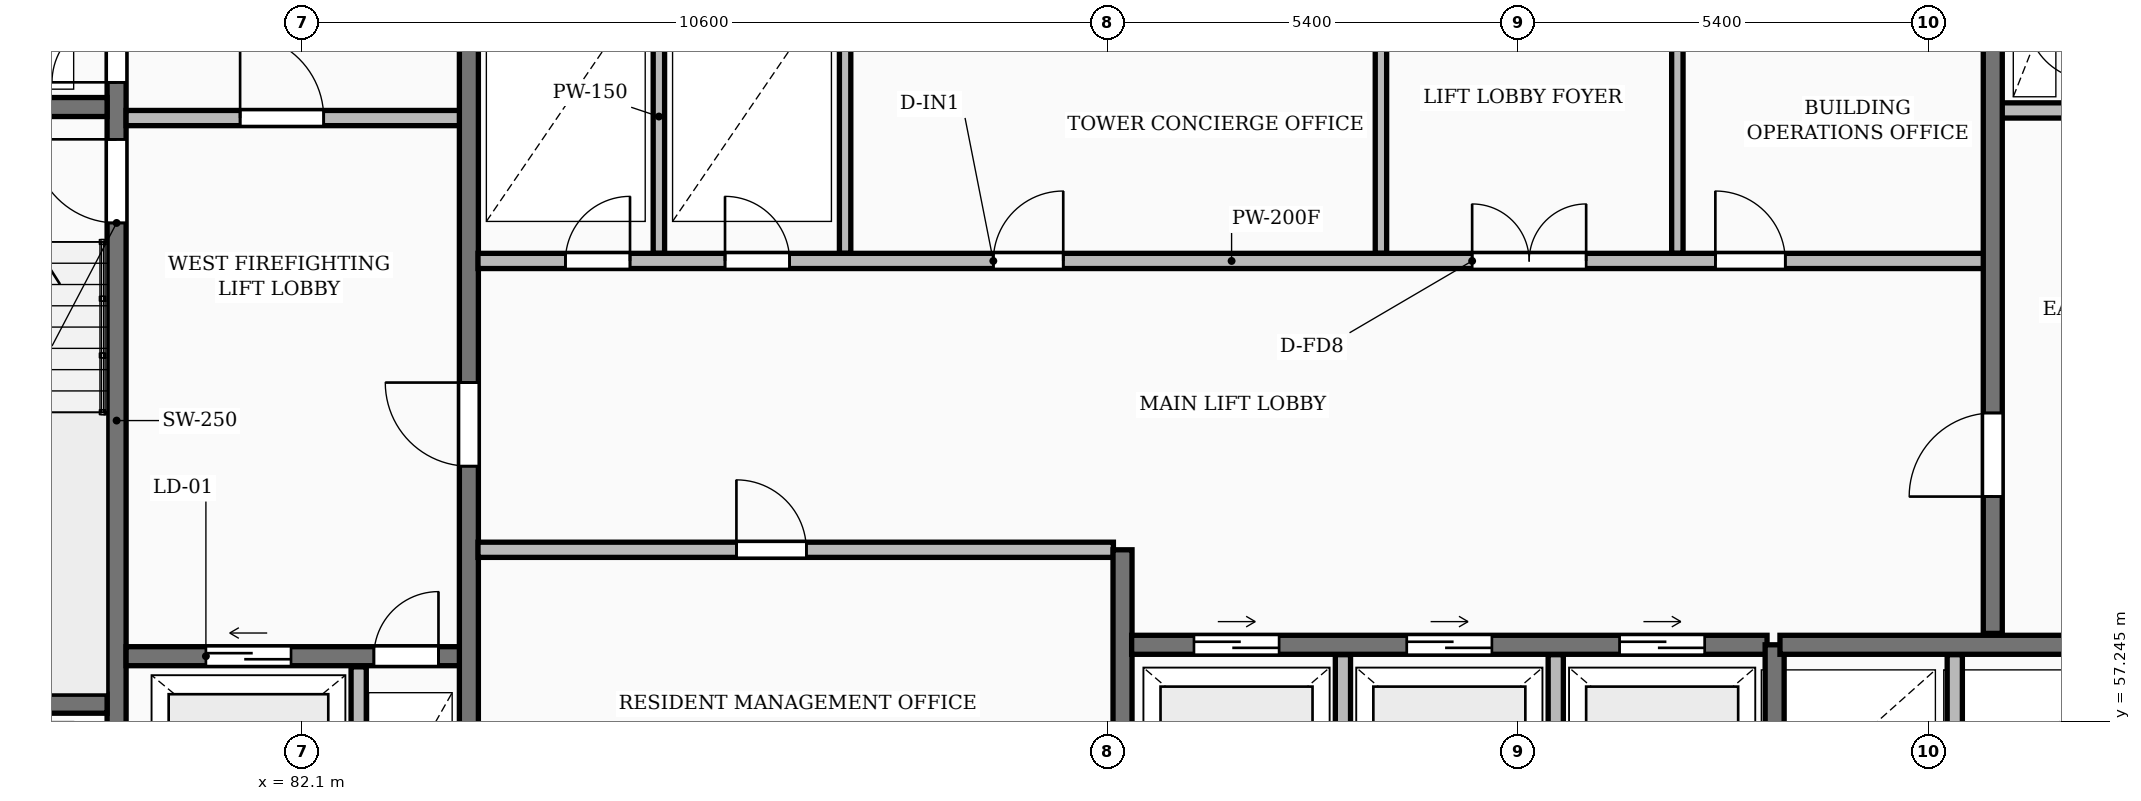
"""IFC4 building model, lengths in metres.
Left out: names, types, materials, properties, quantities, classifications, styles, units other than length and angle.
Written with IfcOpenShell. Run it as: python <this file> out.ifc"""

import sys

from ifc_helpers import new_model, si_unit, direction, frame, frame_2d, origin, place, context, subcontext, project, spatial, rectangle, extrude, element, fill, save


model = new_model("IFC4")
c1 = context("Model", 3, precision=1e-05, world=origin(), true_north=direction((0.0, 1.0)))
c2 = subcontext(c1, "Body", "Model", "MODEL_VIEW")
j1 = project(units=[si_unit("LENGTHUNIT", "METRE"), si_unit("PLANEANGLEUNIT", "RADIAN")], contexts=[c1])
p1 = place(None, origin())
s1 = spatial("IfcSite", under=j1, at=p1, CompositionType="ELEMENT")
p2 = place(p1, origin())
s2 = spatial("IfcBuilding", under=s1, at=p2, CompositionType="ELEMENT")
p3 = place(p2, frame((0.0, 0.0, 168.6)))
s3 = spatial("IfcBuildingStorey", under=s2, at=p3, CompositionType="ELEMENT", Elevation=168.6)
p4 = place(p3, frame((79.665, 55.4, 0.0), z_axis=(0.0, 0.0, 1.0), x_axis=(0.0, 1.0, 0.0)))
e1 = element("IfcWall", 1, at=p4, inside=s3, PredefinedType="SHEAR", context=c2, shape_type="SweptSolid", body=[
    extrude(rectangle(XDim=11.6, YDim=0.25, at=frame_2d((5.8, 0.0))), origin(), (0.0, 0.0, 1.0), 3.25),
])
p5 = place(p4, frame((0.55, 0.0, 0.0)))
e2 = element("IfcOpeningElement", 2, at=p5, cuts=e1, PredefinedType="OPENING", context=c2, shape_type="SweptSolid", body=[
    extrude(rectangle(XDim=0.85, YDim=2.05, at=frame_2d((0.425, 1.025))), frame((0.0, 0.135, 0.0), z_axis=(0.0, -1.0, 0.0), x_axis=(1.0, 0.0, 0.0)), (0.0, 0.0, 1.0), 0.27),
])
p6 = place(p4, frame((8.4, 0.0, 0.0)))
e3 = element("IfcOpeningElement", 3, at=p6, cuts=e1, PredefinedType="OPENING", context=c2, shape_type="SweptSolid", body=[
    extrude(rectangle(XDim=1.1, YDim=2.1, at=frame_2d((0.55, 1.05))), frame((0.0, 0.135, 0.0), z_axis=(0.0, -1.0, 0.0), x_axis=(1.0, 0.0, 0.0)), (0.0, 0.0, 1.0), 0.27),
])
p7 = place(p4, frame((10.25, 0.0, 0.0)))
e4 = element("IfcOpeningElement", 4, at=p7, cuts=e1, PredefinedType="OPENING", context=c2, shape_type="SweptSolid", body=[
    extrude(rectangle(XDim=0.85, YDim=2.05, at=frame_2d((0.425, 1.025))), frame((0.0, 0.135, 0.0), z_axis=(0.0, -1.0, 0.0), x_axis=(1.0, 0.0, 0.0)), (0.0, 0.0, 1.0), 0.27),
])
for number, where, z_axis, x_axis in (
    (5, (76.3, 57.475, 0.0), (0.0, 0.0, 1.0), (1.0, 0.0, 0.0)),
    (6, (76.3, 65.325, 0.0), (0.0, 0.0, 1.0), (1.0, 0.0, 0.0)),
):
    element("IfcWall", number, at=place(p3, frame(where, z_axis=z_axis, x_axis=x_axis)), inside=s3, PredefinedType="SHEAR", context=c2, shape_type="SweptSolid", body=[
        extrude(rectangle(XDim=3.24, YDim=0.25, at=frame_2d((1.62, 0.0))), origin(), (0.0, 0.0, 1.0), 3.25),
    ])
p8 = place(p3, frame((79.79, 58.1, 0.0), z_axis=(0.0, 0.0, 1.0), x_axis=(1.0, 0.0, 0.0)))
e7 = element("IfcWall", 7, at=p8, inside=s3, PredefinedType="SHEAR", context=c2, shape_type="SweptSolid", body=[
    extrude(rectangle(XDim=4.39, YDim=0.25, at=frame_2d((2.195, 0.0))), origin(), (0.0, 0.0, 1.0), 3.25),
])
p9 = place(p8, frame((1.05, 0.0, 0.0)))
e8 = element("IfcOpeningElement", 8, at=p9, cuts=e7, PredefinedType="OPENING", context=c2, shape_type="SweptSolid", body=[
    extrude(rectangle(XDim=1.12, YDim=2.12, at=frame_2d((0.56, 1.06))), frame((0.0, 0.135, 0.0), z_axis=(0.0, -1.0, 0.0), x_axis=(1.0, 0.0, 0.0)), (0.0, 0.0, 1.0), 0.27),
])
p10 = place(p8, frame((3.26, 0.0, 0.0)))
e9 = element("IfcOpeningElement", 9, at=p10, cuts=e7, PredefinedType="OPENING", context=c2, shape_type="SweptSolid", body=[
    extrude(rectangle(XDim=0.85, YDim=2.05, at=frame_2d((0.425, 1.025))), frame((0.0, 0.135, 0.0), z_axis=(0.0, -1.0, 0.0), x_axis=(1.0, 0.0, 0.0)), (0.0, 0.0, 1.0), 0.27),
])
p11 = place(p3, frame((82.85, 55.4, 0.0), z_axis=(0.0, 0.0, 1.0), x_axis=(0.0, 1.0, 0.0)))
e10 = element("IfcWall", 10, at=p11, inside=s3, PredefinedType="PARTITIONING", context=c2, shape_type="SweptSolid", body=[
    extrude(rectangle(XDim=2.56, YDim=0.2, at=frame_2d((1.28, 0.0))), origin(), (0.0, 0.0, 1.0), 2.97),
])
p12 = place(p3, frame((79.79, 65.18, 0.0), z_axis=(0.0, 0.0, 1.0), x_axis=(1.0, 0.0, 0.0)))
e11 = element("IfcWall", 11, at=p12, inside=s3, PredefinedType="PARTITIONING", context=c2, shape_type="SweptSolid", body=[
    extrude(rectangle(XDim=4.39, YDim=0.2, at=frame_2d((2.195, 0.0))), origin(), (0.0, 0.0, 1.0), 2.97),
])
p13 = place(p12, frame((1.5, 0.0, 0.0)))
e12 = element("IfcOpeningElement", 12, at=p13, cuts=e11, PredefinedType="OPENING", context=c2, shape_type="SweptSolid", body=[
    extrude(rectangle(XDim=1.1, YDim=2.1, at=frame_2d((0.55, 1.05))), frame((0.0, 0.11, 0.0), z_axis=(0.0, -1.0, 0.0), x_axis=(1.0, 0.0, 0.0)), (0.0, 0.0, 1.0), 0.22),
])
p14 = place(p3, frame((84.3, 55.4, 0.0), z_axis=(0.0, 0.0, 1.0), x_axis=(0.0, 1.0, 0.0)))
e13 = element("IfcWall", 13, at=p14, inside=s3, PredefinedType="SHEAR", context=c2, shape_type="SweptSolid", body=[
    extrude(rectangle(XDim=11.6, YDim=0.25, at=frame_2d((5.8, 0.0))), origin(), (0.0, 0.0, 1.0), 3.25),
])
p15 = place(p14, frame((5.2, 0.0, 0.0)))
e14 = element("IfcOpeningElement", 14, at=p15, cuts=e13, PredefinedType="OPENING", context=c2, shape_type="SweptSolid", body=[
    extrude(rectangle(XDim=1.1, YDim=2.1, at=frame_2d((0.55, 1.05))), frame((0.0, 0.135, 0.0), z_axis=(0.0, -1.0, 0.0), x_axis=(1.0, 0.0, 0.0)), (0.0, 0.0, 1.0), 0.27),
])
p16 = place(p3, frame((84.42, 59.5, 0.0), z_axis=(0.0, 0.0, 1.0), x_axis=(1.0, 0.0, 0.0)))
e15 = element("IfcWall", 15, at=p16, inside=s3, PredefinedType="PARTITIONING", context=c2, shape_type="SweptSolid", body=[
    extrude(rectangle(XDim=8.36, YDim=0.2, at=frame_2d((4.18, 0.0))), origin(), (0.0, 0.0, 1.0), 2.97),
])
p17 = place(p16, frame((3.4, 0.0, 0.0)))
e16 = element("IfcOpeningElement", 16, at=p17, cuts=e15, PredefinedType="OPENING", context=c2, shape_type="SweptSolid", body=[
    extrude(rectangle(XDim=0.92, YDim=2.08, at=frame_2d((0.46, 1.04))), frame((0.0, 0.11, 0.0), z_axis=(0.0, -1.0, 0.0), x_axis=(1.0, 0.0, 0.0)), (0.0, 0.0, 1.0), 0.22),
])
p18 = place(p3, frame((92.9, 55.4, 0.0), z_axis=(0.0, 0.0, 1.0), x_axis=(0.0, 1.0, 0.0)))
e17 = element("IfcWall", 17, at=p18, inside=s3, PredefinedType="SHEAR", context=c2, shape_type="SweptSolid", body=[
    extrude(rectangle(XDim=4.1, YDim=0.25, at=frame_2d((2.05, 0.0))), origin(), (0.0, 0.0, 1.0), 3.25),
])
for number, where, z_axis, x_axis in (
    (18, (95.8, 55.4, 0.0), (0.0, 0.0, 1.0), (0.0, 1.0, 0.0)),
    (19, (98.6, 55.4, 0.0), (0.0, 0.0, 1.0), (0.0, 1.0, 0.0)),
):
    element("IfcWall", number, at=place(p3, frame(where, z_axis=z_axis, x_axis=x_axis)), inside=s3, PredefinedType="PARTITIONING", context=c2, shape_type="SweptSolid", body=[
        extrude(rectangle(XDim=2.72, YDim=0.2, at=frame_2d((1.36, 0.0))), origin(), (0.0, 0.0, 1.0), 2.97),
    ])
p19 = place(p3, frame((93.02, 58.25, 0.0), z_axis=(0.0, 0.0, 1.0), x_axis=(1.0, 0.0, 0.0)))
e20 = element("IfcWall", 20, at=p19, inside=s3, PredefinedType="SHEAR", context=c2, shape_type="SweptSolid", body=[
    extrude(rectangle(XDim=8.36, YDim=0.25, at=frame_2d((4.18, 0.0))), origin(), (0.0, 0.0, 1.0), 3.25),
])
p20 = place(p19, frame((0.82, 0.0, 0.0)))
e21 = element("IfcOpeningElement", 21, at=p20, cuts=e20, PredefinedType="OPENING", context=c2, shape_type="SweptSolid", body=[
    extrude(rectangle(XDim=1.12, YDim=2.12, at=frame_2d((0.56, 1.06))), frame((0.0, 0.135, 0.0), z_axis=(0.0, -1.0, 0.0), x_axis=(1.0, 0.0, 0.0)), (0.0, 0.0, 1.0), 0.27),
])
p21 = place(p19, frame((3.62, 0.0, 0.0)))
e22 = element("IfcOpeningElement", 22, at=p21, cuts=e20, PredefinedType="OPENING", context=c2, shape_type="SweptSolid", body=[
    extrude(rectangle(XDim=1.12, YDim=2.12, at=frame_2d((0.56, 1.06))), frame((0.0, 0.135, 0.0), z_axis=(0.0, -1.0, 0.0), x_axis=(1.0, 0.0, 0.0)), (0.0, 0.0, 1.0), 0.27),
])
p22 = place(p19, frame((6.42, 0.0, 0.0)))
e23 = element("IfcOpeningElement", 23, at=p22, cuts=e20, PredefinedType="OPENING", context=c2, shape_type="SweptSolid", body=[
    extrude(rectangle(XDim=1.12, YDim=2.12, at=frame_2d((0.56, 1.06))), frame((0.0, 0.135, 0.0), z_axis=(0.0, -1.0, 0.0), x_axis=(1.0, 0.0, 0.0)), (0.0, 0.0, 1.0), 0.27),
])
p23 = place(p3, frame((101.48, 55.4, 0.0), z_axis=(0.0, 0.0, 1.0), x_axis=(0.0, 1.0, 0.0)))
e24 = element("IfcWall", 24, at=p23, inside=s3, PredefinedType="SHEAR", context=c2, shape_type="SweptSolid", body=[
    extrude(rectangle(XDim=2.85, YDim=0.25, at=frame_2d((1.425, 0.0))), origin(), (0.0, 0.0, 1.0), 3.25),
])
p24 = place(p3, frame((103.85, 55.4, 0.0), z_axis=(0.0, 0.0, 1.0), x_axis=(0.0, 1.0, 0.0)))
e25 = element("IfcWall", 25, at=p24, inside=s3, PredefinedType="PARTITIONING", context=c2, shape_type="SweptSolid", body=[
    extrude(rectangle(XDim=2.72, YDim=0.2, at=frame_2d((1.36, 0.0))), origin(), (0.0, 0.0, 1.0), 2.97),
])
p25 = place(p3, frame((101.55, 58.25, 0.0), z_axis=(0.0, 0.0, 1.0), x_axis=(1.0, 0.0, 0.0)))
e26 = element("IfcWall", 26, at=p25, inside=s3, PredefinedType="SHEAR", context=c2, shape_type="SweptSolid", body=[
    extrude(rectangle(XDim=4.6, YDim=0.25, at=frame_2d((2.3, 0.0))), origin(), (0.0, 0.0, 1.0), 3.25),
])
for number, where, z_axis, x_axis in (
    (27, (86.8, 63.4, 0.0), (0.0, 0.0, 1.0), (0.0, 1.0, 0.0)),
    (28, (89.25, 63.4, 0.0), (0.0, 0.0, 1.0), (0.0, 1.0, 0.0)),
    (29, (96.3, 63.4, 0.0), (0.0, 0.0, 1.0), (0.0, 1.0, 0.0)),
    (30, (100.2, 63.4, 0.0), (0.0, 0.0, 1.0), (0.0, 1.0, 0.0)),
):
    element("IfcWall", number, at=place(p3, frame(where, z_axis=z_axis, x_axis=x_axis)), inside=s3, PredefinedType="PARTITIONING", context=c2, shape_type="SweptSolid", body=[
        extrude(rectangle(XDim=3.6, YDim=0.15, at=frame_2d((1.8, 0.0))), origin(), (0.0, 0.0, 1.0), 2.97),
    ])
p26 = place(p3, frame((84.42, 63.3, 0.0), z_axis=(0.0, 0.0, 1.0), x_axis=(1.0, 0.0, 0.0)))
e31 = element("IfcWall", 31, at=p26, inside=s3, PredefinedType="PARTITIONING", context=c2, shape_type="SweptSolid", body=[
    extrude(rectangle(XDim=19.83, YDim=0.2, at=frame_2d((9.915, 0.0))), origin(), (0.0, 0.0, 1.0), 2.97),
])
p27 = place(p26, frame((1.15, 0.0, 0.0)))
e32 = element("IfcOpeningElement", 32, at=p27, cuts=e31, PredefinedType="OPENING", context=c2, shape_type="SweptSolid", body=[
    extrude(rectangle(XDim=0.85, YDim=2.05, at=frame_2d((0.425, 1.025))), frame((0.0, 0.11, 0.0), z_axis=(0.0, -1.0, 0.0), x_axis=(1.0, 0.0, 0.0)), (0.0, 0.0, 1.0), 0.22),
])
p28 = place(p26, frame((3.25, 0.0, 0.0)))
e33 = element("IfcOpeningElement", 33, at=p28, cuts=e31, PredefinedType="OPENING", context=c2, shape_type="SweptSolid", body=[
    extrude(rectangle(XDim=0.85, YDim=2.05, at=frame_2d((0.425, 1.025))), frame((0.0, 0.11, 0.0), z_axis=(0.0, -1.0, 0.0), x_axis=(1.0, 0.0, 0.0)), (0.0, 0.0, 1.0), 0.22),
])
p29 = place(p26, frame((13.08, 0.0, 0.0)))
e34 = element("IfcOpeningElement", 34, at=p29, cuts=e31, PredefinedType="OPENING", context=c2, shape_type="SweptSolid", body=[
    extrude(rectangle(XDim=1.5, YDim=2.2, at=frame_2d((0.75, 1.1))), frame((0.0, 0.11, 0.0), z_axis=(0.0, -1.0, 0.0), x_axis=(1.0, 0.0, 0.0)), (0.0, 0.0, 1.0), 0.22),
])
p30 = place(p26, frame((6.78, 0.0, 0.0)))
e35 = element("IfcOpeningElement", 35, at=p30, cuts=e31, PredefinedType="OPENING", context=c2, shape_type="SweptSolid", body=[
    extrude(rectangle(XDim=0.92, YDim=2.08, at=frame_2d((0.46, 1.04))), frame((0.0, 0.11, 0.0), z_axis=(0.0, -1.0, 0.0), x_axis=(1.0, 0.0, 0.0)), (0.0, 0.0, 1.0), 0.22),
])
p31 = place(p26, frame((16.28, 0.0, 0.0)))
e36 = element("IfcOpeningElement", 36, at=p31, cuts=e31, PredefinedType="OPENING", context=c2, shape_type="SweptSolid", body=[
    extrude(rectangle(XDim=0.92, YDim=2.08, at=frame_2d((0.46, 1.04))), frame((0.0, 0.11, 0.0), z_axis=(0.0, -1.0, 0.0), x_axis=(1.0, 0.0, 0.0)), (0.0, 0.0, 1.0), 0.22),
])
p32 = place(p3, frame((104.45, 65.28, 0.0), z_axis=(0.0, 0.0, 1.0), x_axis=(1.0, 0.0, 0.0)))
e37 = element("IfcWall", 37, at=p32, inside=s3, PredefinedType="PARTITIONING", context=c2, shape_type="SweptSolid", body=[
    extrude(rectangle(XDim=1.2, YDim=0.2, at=frame_2d((0.6, 0.0))), origin(), (0.0, 0.0, 1.0), 2.97),
])
p33 = place(p3, frame((104.35, 58.4, 0.0), z_axis=(0.0, 0.0, 1.0), x_axis=(0.0, 1.0, 0.0)))
e38 = element("IfcWall", 38, at=p33, inside=s3, PredefinedType="SHEAR", context=c2, shape_type="SweptSolid", body=[
    extrude(rectangle(XDim=8.6, YDim=0.25, at=frame_2d((4.3, 0.0))), origin(), (0.0, 0.0, 1.0), 3.25),
])
p34 = place(p33, frame((1.8, 0.0, 0.0)))
e39 = element("IfcOpeningElement", 39, at=p34, cuts=e38, PredefinedType="OPENING", context=c2, shape_type="SweptSolid", body=[
    extrude(rectangle(XDim=1.1, YDim=2.1, at=frame_2d((0.55, 1.05))), frame((0.0, 0.135, 0.0), z_axis=(0.0, -1.0, 0.0), x_axis=(1.0, 0.0, 0.0)), (0.0, 0.0, 1.0), 0.27),
])
p35 = place(p6, origin())
e40 = element("IfcDoor", 40, at=p35, inside=s3, OperationType="SINGLE_SWING_RIGHT", PredefinedType="DOOR", context=c2, shape_type="SweptSolid", body=[
    extrude(rectangle(XDim=1.1, YDim=2.1, at=frame_2d((0.55, 1.05))), frame((0.0, 0.025, 0.0), z_axis=(0.0, -1.0, 0.0), x_axis=(1.0, 0.0, 0.0)), (0.0, 0.0, 1.0), 0.05),
])
fill(e3, e40)
p36 = place(p7, origin())
e41 = element("IfcDoor", 41, at=p36, inside=s3, OperationType="SINGLE_SWING_LEFT", PredefinedType="DOOR", context=c2, shape_type="SweptSolid", body=[
    extrude(rectangle(XDim=0.85, YDim=2.05, at=frame_2d((0.425, 1.025))), frame((0.0, 0.025, 0.0), z_axis=(0.0, -1.0, 0.0), x_axis=(1.0, 0.0, 0.0)), (0.0, 0.0, 1.0), 0.05),
])
fill(e4, e41)
p37 = place(p9, origin())
e42 = element("IfcDoor", 42, at=p37, inside=s3, OperationType="SLIDING_TO_LEFT", PredefinedType="DOOR", context=c2, shape_type="SweptSolid", body=[
    extrude(rectangle(XDim=1.12, YDim=2.12, at=frame_2d((0.56, 1.06))), frame((0.0, 0.025, 0.0), z_axis=(0.0, -1.0, 0.0), x_axis=(1.0, 0.0, 0.0)), (0.0, 0.0, 1.0), 0.05),
])
fill(e8, e42)
p38 = place(p10, origin())
e43 = element("IfcDoor", 43, at=p38, inside=s3, OperationType="SINGLE_SWING_RIGHT", PredefinedType="DOOR", context=c2, shape_type="SweptSolid", body=[
    extrude(rectangle(XDim=0.85, YDim=2.05, at=frame_2d((0.425, 1.025))), frame((0.0, 0.025, 0.0), z_axis=(0.0, -1.0, 0.0), x_axis=(1.0, 0.0, 0.0)), (0.0, 0.0, 1.0), 0.05),
])
fill(e9, e43)
p39 = place(p13, origin())
e44 = element("IfcDoor", 44, at=p39, inside=s3, OperationType="SINGLE_SWING_LEFT", PredefinedType="DOOR", context=c2, shape_type="SweptSolid", body=[
    extrude(rectangle(XDim=1.1, YDim=2.1, at=frame_2d((0.55, 1.05))), frame((0.0, 0.025, 0.0), z_axis=(0.0, -1.0, 0.0), x_axis=(1.0, 0.0, 0.0)), (0.0, 0.0, 1.0), 0.05),
])
fill(e12, e44)
p40 = place(p15, origin())
e45 = element("IfcDoor", 45, at=p40, inside=s3, OperationType="SINGLE_SWING_RIGHT", PredefinedType="DOOR", context=c2, shape_type="SweptSolid", body=[
    extrude(rectangle(XDim=1.1, YDim=2.1, at=frame_2d((0.55, 1.05))), frame((0.0, 0.025, 0.0), z_axis=(0.0, -1.0, 0.0), x_axis=(1.0, 0.0, 0.0)), (0.0, 0.0, 1.0), 0.05),
])
fill(e14, e45)
p41 = place(p17, origin())
e46 = element("IfcDoor", 46, at=p41, inside=s3, OperationType="SINGLE_SWING_LEFT", PredefinedType="DOOR", context=c2, shape_type="SweptSolid", body=[
    extrude(rectangle(XDim=0.92, YDim=2.08, at=frame_2d((0.46, 1.04))), frame((0.0, 0.025, 0.0), z_axis=(0.0, -1.0, 0.0), x_axis=(1.0, 0.0, 0.0)), (0.0, 0.0, 1.0), 0.05),
])
fill(e16, e46)
p42 = place(p20, origin())
e47 = element("IfcDoor", 47, at=p42, inside=s3, OperationType="SLIDING_TO_RIGHT", PredefinedType="DOOR", context=c2, shape_type="SweptSolid", body=[
    extrude(rectangle(XDim=1.12, YDim=2.12, at=frame_2d((0.56, 1.06))), frame((0.0, 0.025, 0.0), z_axis=(0.0, -1.0, 0.0), x_axis=(1.0, 0.0, 0.0)), (0.0, 0.0, 1.0), 0.05),
])
fill(e21, e47)
p43 = place(p21, origin())
e48 = element("IfcDoor", 48, at=p43, inside=s3, OperationType="SLIDING_TO_RIGHT", PredefinedType="DOOR", context=c2, shape_type="SweptSolid", body=[
    extrude(rectangle(XDim=1.12, YDim=2.12, at=frame_2d((0.56, 1.06))), frame((0.0, 0.025, 0.0), z_axis=(0.0, -1.0, 0.0), x_axis=(1.0, 0.0, 0.0)), (0.0, 0.0, 1.0), 0.05),
])
fill(e22, e48)
p44 = place(p22, origin())
e49 = element("IfcDoor", 49, at=p44, inside=s3, OperationType="SLIDING_TO_RIGHT", PredefinedType="DOOR", context=c2, shape_type="SweptSolid", body=[
    extrude(rectangle(XDim=1.12, YDim=2.12, at=frame_2d((0.56, 1.06))), frame((0.0, 0.025, 0.0), z_axis=(0.0, -1.0, 0.0), x_axis=(1.0, 0.0, 0.0)), (0.0, 0.0, 1.0), 0.05),
])
fill(e23, e49)
p45 = place(p27, origin())
e50 = element("IfcDoor", 50, at=p45, inside=s3, OperationType="SINGLE_SWING_RIGHT", PredefinedType="DOOR", context=c2, shape_type="SweptSolid", body=[
    extrude(rectangle(XDim=0.85, YDim=2.05, at=frame_2d((0.425, 1.025))), frame((0.0, 0.025, 0.0), z_axis=(0.0, -1.0, 0.0), x_axis=(1.0, 0.0, 0.0)), (0.0, 0.0, 1.0), 0.05),
])
fill(e32, e50)
p46 = place(p28, origin())
e51 = element("IfcDoor", 51, at=p46, inside=s3, OperationType="SINGLE_SWING_LEFT", PredefinedType="DOOR", context=c2, shape_type="SweptSolid", body=[
    extrude(rectangle(XDim=0.85, YDim=2.05, at=frame_2d((0.425, 1.025))), frame((0.0, 0.025, 0.0), z_axis=(0.0, -1.0, 0.0), x_axis=(1.0, 0.0, 0.0)), (0.0, 0.0, 1.0), 0.05),
])
fill(e33, e51)
p47 = place(p29, origin())
e52 = element("IfcDoor", 52, at=p47, inside=s3, OperationType="DOUBLE_DOOR_SINGLE_SWING", PredefinedType="DOOR", context=c2, shape_type="SweptSolid", body=[
    extrude(rectangle(XDim=1.5, YDim=2.2, at=frame_2d((0.75, 1.1))), frame((0.0, 0.025, 0.0), z_axis=(0.0, -1.0, 0.0), x_axis=(1.0, 0.0, 0.0)), (0.0, 0.0, 1.0), 0.05),
])
fill(e34, e52)
p48 = place(p30, origin())
e53 = element("IfcDoor", 53, at=p48, inside=s3, OperationType="SINGLE_SWING_RIGHT", PredefinedType="DOOR", context=c2, shape_type="SweptSolid", body=[
    extrude(rectangle(XDim=0.92, YDim=2.08, at=frame_2d((0.46, 1.04))), frame((0.0, 0.025, 0.0), z_axis=(0.0, -1.0, 0.0), x_axis=(1.0, 0.0, 0.0)), (0.0, 0.0, 1.0), 0.05),
])
fill(e35, e53)
p49 = place(p31, origin())
e54 = element("IfcDoor", 54, at=p49, inside=s3, OperationType="SINGLE_SWING_LEFT", PredefinedType="DOOR", context=c2, shape_type="SweptSolid", body=[
    extrude(rectangle(XDim=0.92, YDim=2.08, at=frame_2d((0.46, 1.04))), frame((0.0, 0.025, 0.0), z_axis=(0.0, -1.0, 0.0), x_axis=(1.0, 0.0, 0.0)), (0.0, 0.0, 1.0), 0.05),
])
fill(e36, e54)
p50 = place(p34, origin())
e55 = element("IfcDoor", 55, at=p50, inside=s3, OperationType="SINGLE_SWING_LEFT", PredefinedType="DOOR", context=c2, shape_type="SweptSolid", body=[
    extrude(rectangle(XDim=1.1, YDim=2.1, at=frame_2d((0.55, 1.05))), frame((0.0, 0.025, 0.0), z_axis=(0.0, -1.0, 0.0), x_axis=(1.0, 0.0, 0.0)), (0.0, 0.0, 1.0), 0.05),
])
fill(e39, e55)
save(model, sys.argv[1])
